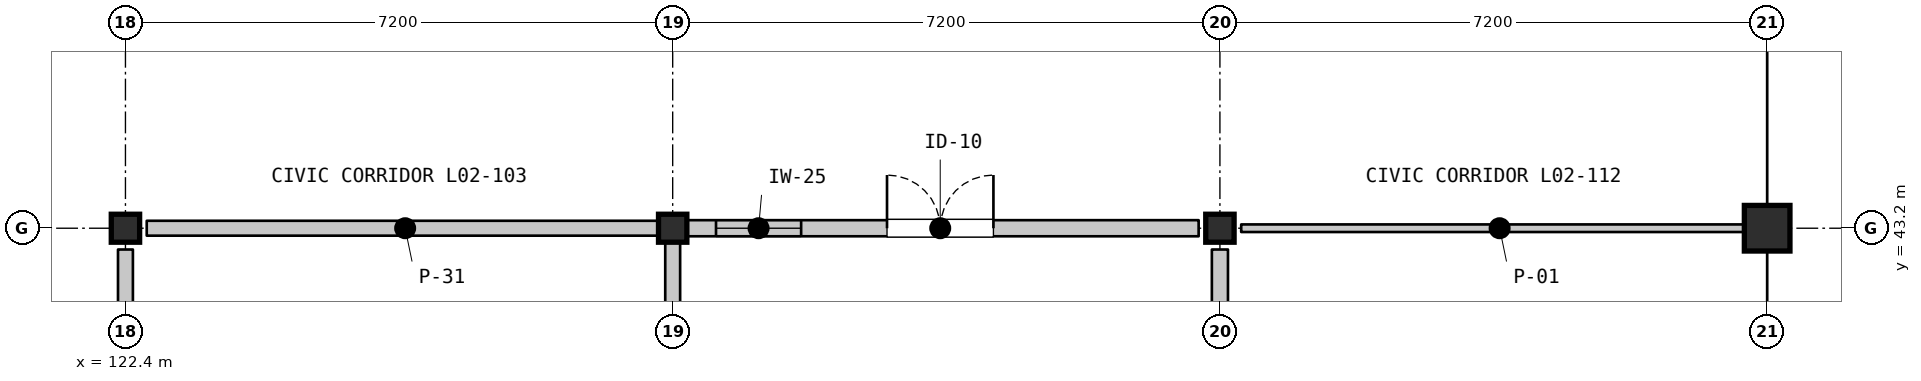
"""IFC4 building model, lengths in metres.
Left out: names, types, materials, properties, quantities, classifications, styles, units other than length and angle.
Written with IfcOpenShell. Run it as: python <this file> out.ifc"""

import sys

from ifc_helpers import new_model, si_unit, direction, frame, frame_2d, origin, origin_2d, place, context, subcontext, project, spatial, rectangle, i_section, extrude, element, fill, save


model = new_model("IFC4")
c1 = context("Model", 3, precision=1e-05, world=origin(), true_north=direction((0.0, 1.0)))
c2 = subcontext(c1, "Body", "Model", "MODEL_VIEW")
j1 = project(units=[si_unit("LENGTHUNIT", "METRE"), si_unit("PLANEANGLEUNIT", "RADIAN")], contexts=[c1])
p1 = place(None, origin())
s1 = spatial("IfcSite", under=j1, at=p1, CompositionType="ELEMENT")
p2 = place(p1, origin())
s2 = spatial("IfcBuilding", under=s1, at=p2, CompositionType="ELEMENT")
p3 = place(p2, frame((0.0, 0.0, 5.4)))
s3 = spatial("IfcBuildingStorey", under=s2, at=p3, CompositionType="ELEMENT", Elevation=5.4)
for number, where, z_axis, x_axis in (
    (1, (122.4, 43.2, 0.0), (0.0, 0.0, 1.0), (1.0, 0.0, 0.0)),
    (2, (129.6, 43.2, 0.0), (0.0, 0.0, 1.0), (1.0, 0.0, 0.0)),
    (3, (136.8, 43.2, 0.0), (0.0, 0.0, 1.0), (1.0, 0.0, 0.0)),
):
    element("IfcColumn", number, at=place(p3, frame(where, z_axis=z_axis, x_axis=x_axis)), inside=s3, PredefinedType="COLUMN", context=c2, shape_type="SweptSolid", body=[
        extrude(i_section(OverallWidth=0.373, OverallDepth=0.368, WebThickness=0.015, FlangeThickness=0.024, FilletRadius=0.015, at=origin_2d()), origin(), (0.0, 0.0, 1.0), 4.5),
    ])
p4 = place(p3, frame((144.0, 43.2, 0.0), z_axis=(0.0, 0.0, 1.0), x_axis=(1.0, 0.0, 0.0)))
e4 = element("IfcColumn", 4, at=p4, inside=s3, PredefinedType="COLUMN", context=c2, shape_type="SweptSolid", body=[
    extrude(rectangle(XDim=0.6, YDim=0.6, at=origin_2d()), origin(), (0.0, 0.0, 1.0), 4.5),
])
p5 = place(p3, frame((122.68, 43.2, 0.0), z_axis=(0.0, 0.0, 1.0), x_axis=(1.0, 0.0, 0.0)))
e5 = element("IfcWall", 5, at=p5, inside=s3, PredefinedType="PARTITIONING", context=c2, shape_type="SweptSolid", body=[
    extrude(rectangle(XDim=6.8, YDim=0.196, at=frame_2d((3.4, 0.0))), origin(), (0.0, 0.0, 1.0), 3.678),
])
p6 = place(p3, frame((122.4, 36.12, 0.0), z_axis=(0.0, 0.0, 1.0), x_axis=(0.0, 1.0, 0.0)))
e6 = element("IfcWall", 6, at=p6, inside=s3, PredefinedType="PARTITIONING", context=c2, shape_type="SweptSolid", body=[
    extrude(rectangle(XDim=6.8, YDim=0.196, at=frame_2d((3.4, 0.0))), origin(), (0.0, 0.0, 1.0), 3.678),
])
p7 = place(p3, frame((129.6, 43.08, 0.0), z_axis=(0.0, 0.0, 1.0), x_axis=(0.0, -1.0, 0.0)))
e7 = element("IfcWall", 7, at=p7, inside=s3, PredefinedType="PARTITIONING", context=c2, shape_type="SweptSolid", body=[
    extrude(rectangle(XDim=6.96, YDim=0.196, at=frame_2d((3.48, 0.0))), origin(), (0.0, 0.0, 1.0), 3.678),
])
p8 = place(p3, frame((129.72, 43.2, 0.0), z_axis=(0.0, 0.0, 1.0), x_axis=(1.0, 0.0, 0.0)))
e8 = element("IfcWall", 8, at=p8, inside=s3, PredefinedType="PARTITIONING", context=c2, shape_type="SweptSolid", body=[
    extrude(rectangle(XDim=6.8, YDim=0.212, at=frame_2d((3.4, 0.0))), origin(), (0.0, 0.0, 1.0), 3.678),
])
p9 = place(p8, frame((2.7, 0.0, 0.0)))
e9 = element("IfcOpeningElement", 9, at=p9, cuts=e8, PredefinedType="OPENING", context=c2, shape_type="SweptSolid", body=[
    extrude(rectangle(XDim=1.4, YDim=2.25, at=frame_2d((0.7, 1.125))), frame((0.0, 0.116, 0.0), z_axis=(0.0, -1.0, 0.0), x_axis=(1.0, 0.0, 0.0)), (0.0, 0.0, 1.0), 0.232),
])
p10 = place(p8, frame((0.45, 0.0, 1.05)))
e10 = element("IfcOpeningElement", 10, at=p10, cuts=e8, PredefinedType="OPENING", context=c2, shape_type="SweptSolid", body=[
    extrude(rectangle(XDim=1.12, YDim=0.92, at=frame_2d((0.56, 0.46))), frame((0.0, 0.116, 0.0), z_axis=(0.0, -1.0, 0.0), x_axis=(1.0, 0.0, 0.0)), (0.0, 0.0, 1.0), 0.232),
])
p11 = place(p3, frame((136.8, 42.92, 0.0), z_axis=(0.0, 0.0, 1.0), x_axis=(0.0, -1.0, 0.0)))
e11 = element("IfcWall", 11, at=p11, inside=s3, PredefinedType="PARTITIONING", context=c2, shape_type="SweptSolid", body=[
    extrude(rectangle(XDim=6.8, YDim=0.212, at=frame_2d((3.4, 0.0))), origin(), (0.0, 0.0, 1.0), 3.678),
])
p12 = place(p3, frame((137.08, 43.2, 0.0), z_axis=(0.0, 0.0, 1.0), x_axis=(1.0, 0.0, 0.0)))
e12 = element("IfcWall", 12, at=p12, inside=s3, PredefinedType="PARTITIONING", context=c2, shape_type="SweptSolid", body=[
    extrude(rectangle(XDim=6.8, YDim=0.1, at=frame_2d((3.4, 0.0))), origin(), (0.0, 0.0, 1.0), 3.678),
])
p13 = place(p9, origin())
e13 = element("IfcDoor", 13, at=p13, inside=s3, OperationType="DOUBLE_DOOR_SINGLE_SWING", PredefinedType="DOOR", context=c2, shape_type="SweptSolid", body=[
    extrude(rectangle(XDim=1.4, YDim=2.25, at=frame_2d((0.7, 1.125))), frame((0.0, 0.025, 0.0), z_axis=(0.0, -1.0, 0.0), x_axis=(1.0, 0.0, 0.0)), (0.0, 0.0, 1.0), 0.05),
])
fill(e9, e13)
p14 = place(p10, origin())
e14 = element("IfcWindow", 14, at=p14, inside=s3, PartitioningType="SINGLE_PANEL", PredefinedType="WINDOW", context=c2, shape_type="SweptSolid", body=[
    extrude(rectangle(XDim=1.12, YDim=0.92, at=frame_2d((0.56, 0.46))), frame((0.0, 0.03, 0.0), z_axis=(0.0, -1.0, 0.0), x_axis=(1.0, 0.0, 0.0)), (0.0, 0.0, 1.0), 0.06),
])
fill(e10, e14)
save(model, sys.argv[1])
